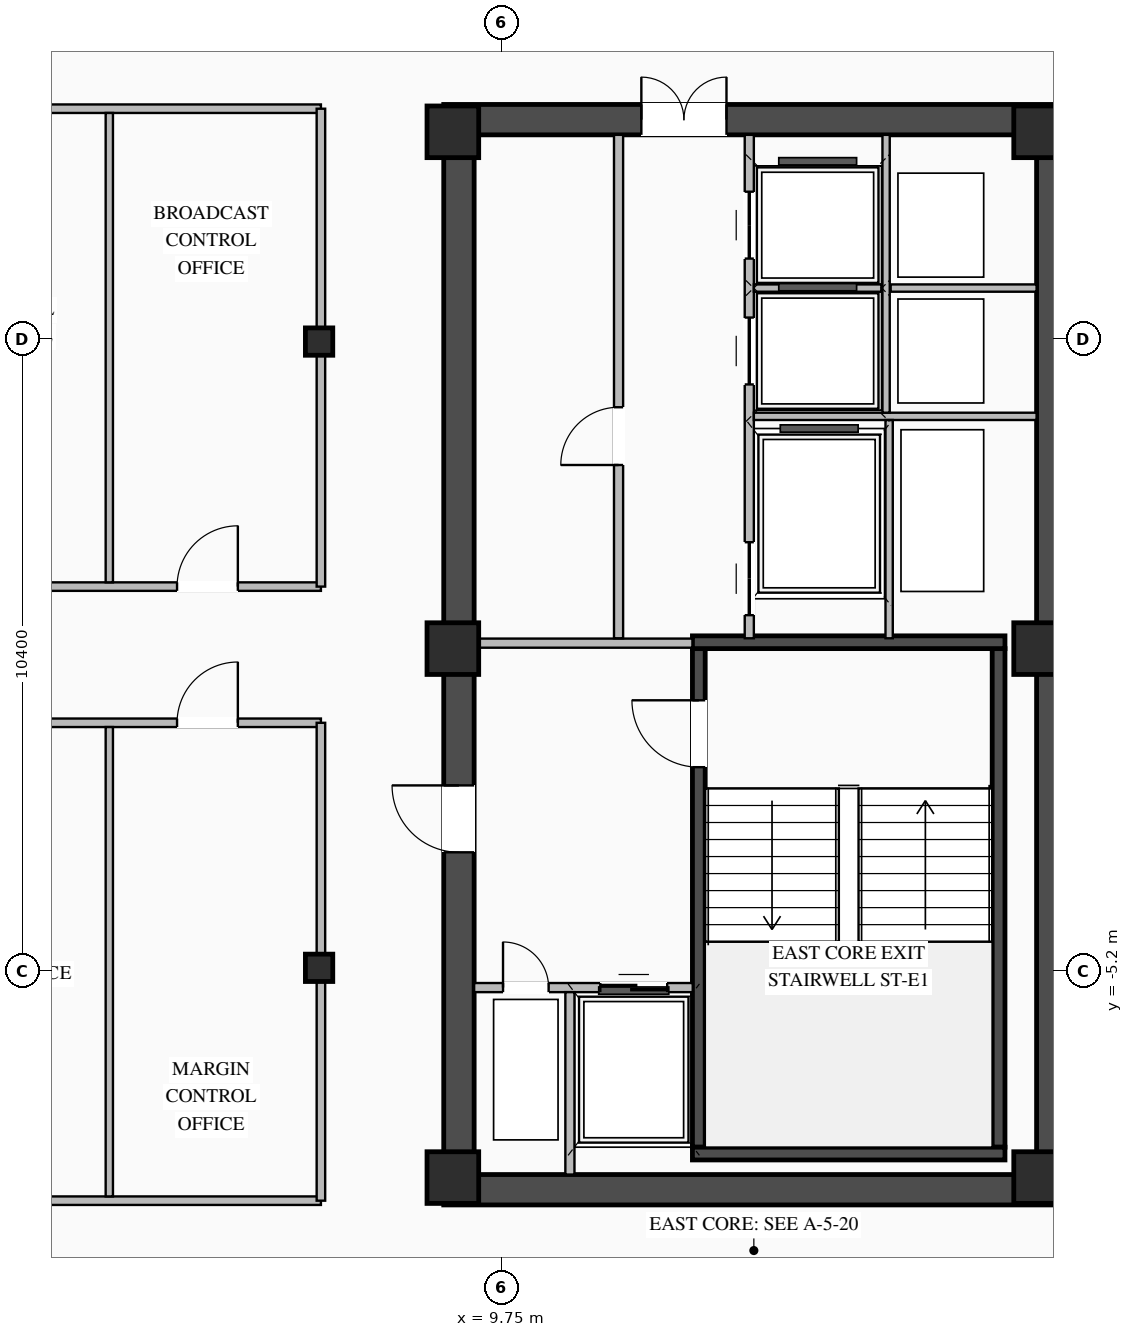
"""IFC4 building model, lengths in metres.
Left out: names, types, materials, properties, quantities, classifications, styles, units other than length and angle.
Written with IfcOpenShell. Run it as: python <this file> out.ifc"""

import sys

from ifc_helpers import new_model, si_unit, direction, frame, frame_2d, origin, origin_2d, place, context, subcontext, project, spatial, rectangle, i_section, extrude, element, fill, save


model = new_model("IFC4")
c1 = context("Model", 3, precision=1e-05, world=origin(), true_north=direction((0.0, 1.0)))
c2 = subcontext(c1, "Body", "Model", "MODEL_VIEW")
j1 = project(units=[si_unit("LENGTHUNIT", "METRE"), si_unit("PLANEANGLEUNIT", "RADIAN")], contexts=[c1])
p1 = place(None, origin())
s1 = spatial("IfcSite", under=j1, at=p1, CompositionType="ELEMENT")
p2 = place(p1, origin())
s2 = spatial("IfcBuilding", under=s1, at=p2, CompositionType="ELEMENT")
p3 = place(p2, frame((0.0, 0.0, 279.3)))
s3 = spatial("IfcBuildingStorey", under=s2, at=p3, CompositionType="ELEMENT", Elevation=279.3)
p4 = place(p3, frame((8.8, -8.8, 0.0), z_axis=(0.0, 0.0, 1.0), x_axis=(1.0, 0.0, 0.0)))
e1 = element("IfcWall", 1, at=p4, inside=s3, PredefinedType="SHEAR", context=c2, shape_type="SweptSolid", body=[
    extrude(rectangle(XDim=10.25, YDim=0.5, at=frame_2d((5.125, 0.0))), origin(), (0.0, 0.0, 1.0), 3.27),
])
p5 = place(p3, frame((8.8, 8.8, 0.0), z_axis=(0.0, 0.0, 1.0), x_axis=(1.0, 0.0, 0.0)))
e2 = element("IfcWall", 2, at=p5, inside=s3, PredefinedType="SHEAR", context=c2, shape_type="SweptSolid", body=[
    extrude(rectangle(XDim=10.25, YDim=0.5, at=frame_2d((5.125, 0.0))), origin(), (0.0, 0.0, 1.0), 3.27),
])
p6 = place(p5, frame((3.25, 0.0, 0.0)))
e3 = element("IfcOpeningElement", 3, at=p6, cuts=e2, PredefinedType="OPENING", context=c2, shape_type="SweptSolid", body=[
    extrude(rectangle(XDim=1.4, YDim=2.05, at=frame_2d((0.7, 1.025))), frame((0.0, 0.26, 0.0), z_axis=(0.0, -1.0, 0.0), x_axis=(1.0, 0.0, 0.0)), (0.0, 0.0, 1.0), 0.52),
])
p7 = place(p3, frame((9.05, -8.55, 0.0), z_axis=(0.0, 0.0, 1.0), x_axis=(0.0, 1.0, 0.0)))
e4 = element("IfcWall", 4, at=p7, inside=s3, PredefinedType="SHEAR", context=c2, shape_type="SweptSolid", body=[
    extrude(rectangle(XDim=17.1, YDim=0.5, at=frame_2d((8.55, 0.0))), origin(), (0.0, 0.0, 1.0), 3.27),
])
p8 = place(p7, frame((5.3, 0.0, 0.0)))
e5 = element("IfcOpeningElement", 5, at=p8, cuts=e4, PredefinedType="OPENING", context=c2, shape_type="SweptSolid", body=[
    extrude(rectangle(XDim=1.1, YDim=2.08, at=frame_2d((0.55, 1.04))), frame((0.0, 0.26, 0.0), z_axis=(0.0, -1.0, 0.0), x_axis=(1.0, 0.0, 0.0)), (0.0, 0.0, 1.0), 0.52),
])
p9 = place(p3, frame((18.8, -8.55, 0.0), z_axis=(0.0, 0.0, 1.0), x_axis=(0.0, 1.0, 0.0)))
e6 = element("IfcWall", 6, at=p9, inside=s3, PredefinedType="SHEAR", context=c2, shape_type="SweptSolid", body=[
    extrude(rectangle(XDim=17.1, YDim=0.5, at=frame_2d((8.55, 0.0))), origin(), (0.0, 0.0, 1.0), 3.27),
])
p10 = place(p3, frame((12.995, -8.1, 0.0), z_axis=(0.0, 0.0, 1.0), x_axis=(0.0, 1.0, 0.0)))
e7 = element("IfcWall", 7, at=p10, inside=s3, PredefinedType="SHEAR", context=c2, shape_type="SweptSolid", body=[
    extrude(rectangle(XDim=8.2, YDim=0.21, at=frame_2d((4.1, 0.0))), origin(), (0.0, 0.0, 1.0), 3.27),
])
p11 = place(p10, frame((6.25, 0.0, 0.0)))
e8 = element("IfcOpeningElement", 8, at=p11, cuts=e7, PredefinedType="OPENING", context=c2, shape_type="SweptSolid", body=[
    extrude(rectangle(XDim=1.1, YDim=2.15, at=frame_2d((0.55, 1.075))), frame((0.0, 0.115, 0.0), z_axis=(0.0, -1.0, 0.0), x_axis=(1.0, 0.0, 0.0)), (0.0, 0.0, 1.0), 0.23),
])
p12 = place(p3, frame((17.925, -8.1, 0.0), z_axis=(0.0, 0.0, 1.0), x_axis=(0.0, 1.0, 0.0)))
e9 = element("IfcWall", 9, at=p12, inside=s3, PredefinedType="SHEAR", context=c2, shape_type="SweptSolid", body=[
    extrude(rectangle(XDim=8.2, YDim=0.21, at=frame_2d((4.1, 0.0))), origin(), (0.0, 0.0, 1.0), 3.27),
])
for number, where, z_axis, x_axis in (
    (10, (12.89, -8.205, 0.0), (0.0, 0.0, 1.0), (1.0, 0.0, 0.0)),
    (11, (18.03, 0.205, 0.0), (0.0, 0.0, 1.0), (-1.0, 0.0, 0.0)),
):
    element("IfcWall", number, at=place(p3, frame(where, z_axis=z_axis, x_axis=x_axis)), inside=s3, PredefinedType="SHEAR", context=c2, shape_type="SweptSolid", body=[
        extrude(rectangle(XDim=5.14, YDim=0.21, at=frame_2d((2.57, 0.0))), origin(), (0.0, 0.0, 1.0), 3.27),
    ])
for number, where, z_axis, x_axis in (
    (12, (8.95, -8.6, 0.0), (0.0, 0.0, 1.0), (1.0, 0.0, 0.0)),
    (13, (8.95, 0.1, 0.0), (0.0, 0.0, 1.0), (1.0, 0.0, 0.0)),
    (14, (8.95, 8.6, 0.0), (0.0, 0.0, 1.0), (1.0, 0.0, 0.0)),
    (15, (18.6, -8.6, 0.0), (0.0, 0.0, 1.0), (1.0, 0.0, 0.0)),
    (16, (18.6, 0.1, 0.0), (0.0, 0.0, 1.0), (1.0, 0.0, 0.0)),
    (17, (18.6, 8.6, 0.0), (0.0, 0.0, 1.0), (1.0, 0.0, 0.0)),
):
    element("IfcColumn", number, at=place(p3, frame(where, z_axis=z_axis, x_axis=x_axis)), inside=s3, PredefinedType="COLUMN", context=c2, shape_type="SweptSolid", body=[
        extrude(rectangle(XDim=0.85, YDim=0.85, at=origin_2d()), origin(), (0.0, 0.0, 1.0), 3.45),
    ])
for number, where, z_axis, x_axis in (
    (18, (6.75, -5.15, 0.0), (0.0, 0.0, 1.0), (1.0, 0.0, 0.0)),
    (19, (6.75, 5.15, 0.0), (0.0, 0.0, 1.0), (1.0, 0.0, 0.0)),
):
    element("IfcColumn", number, at=place(p3, frame(where, z_axis=z_axis, x_axis=x_axis)), inside=s3, PredefinedType="COLUMN", context=c2, shape_type="SweptSolid", body=[
        extrude(i_section(OverallWidth=0.45, OverallDepth=0.45, WebThickness=0.022, FlangeThickness=0.032, at=origin_2d()), origin(), (0.0, 0.0, 1.0), 3.45),
    ])
p13 = place(p3, frame((9.3, -5.475, 0.0), z_axis=(0.0, 0.0, 1.0), x_axis=(1.0, 0.0, 0.0)))
e20 = element("IfcWall", 20, at=p13, inside=s3, PredefinedType="STANDARD", context=c2, shape_type="SweptSolid", body=[
    extrude(rectangle(XDim=3.595, YDim=0.15, at=frame_2d((1.797, 0.0))), origin(), (0.0, 0.0, 1.0), 3.25),
])
p14 = place(p13, frame((2.075, 0.0, 0.0)))
e21 = element("IfcOpeningElement", 21, at=p14, cuts=e20, PredefinedType="OPENING", context=c2, shape_type="SweptSolid", body=[
    extrude(rectangle(XDim=1.1, YDim=2.15, at=frame_2d((0.55, 1.075))), frame((0.0, 0.085, 0.0), z_axis=(0.0, -1.0, 0.0), x_axis=(1.0, 0.0, 0.0)), (0.0, 0.0, 1.0), 0.17),
])
p15 = place(p13, frame((0.475, 0.0, 0.0)))
e22 = element("IfcOpeningElement", 22, at=p15, cuts=e20, PredefinedType="OPENING", context=c2, shape_type="SweptSolid", body=[
    extrude(rectangle(XDim=0.75, YDim=2.05, at=frame_2d((0.375, 1.025))), frame((0.0, 0.085, 0.0), z_axis=(0.0, -1.0, 0.0), x_axis=(1.0, 0.0, 0.0)), (0.0, 0.0, 1.0), 0.17),
])
p16 = place(p3, frame((10.875, -8.55, 0.0), z_axis=(0.0, 0.0, 1.0), x_axis=(0.0, 1.0, 0.0)))
e23 = element("IfcWall", 23, at=p16, inside=s3, PredefinedType="STANDARD", context=c2, shape_type="SweptSolid", body=[
    extrude(rectangle(XDim=3.0, YDim=0.15, at=frame_2d((1.5, 0.0))), origin(), (0.0, 0.0, 1.0), 3.25),
])
p17 = place(p3, frame((9.3, 0.19, 0.0), z_axis=(0.0, 0.0, 1.0), x_axis=(1.0, 0.0, 0.0)))
e24 = element("IfcWall", 24, at=p17, inside=s3, PredefinedType="STANDARD", context=c2, shape_type="SweptSolid", body=[
    extrude(rectangle(XDim=3.59, YDim=0.15, at=frame_2d((1.795, 0.0))), origin(), (0.0, 0.0, 1.0), 2.645),
])
p18 = place(p3, frame((11.675, 0.27, 0.0), z_axis=(0.0, 0.0, 1.0), x_axis=(0.0, 1.0, 0.0)))
e25 = element("IfcWall", 25, at=p18, inside=s3, PredefinedType="STANDARD", context=c2, shape_type="SweptSolid", body=[
    extrude(rectangle(XDim=8.28, YDim=0.15, at=frame_2d((4.14, 0.0))), origin(), (0.0, 0.0, 1.0), 3.25),
])
p19 = place(p18, frame((2.85, 0.0, 0.0)))
e26 = element("IfcOpeningElement", 26, at=p19, cuts=e25, PredefinedType="OPENING", context=c2, shape_type="SweptSolid", body=[
    extrude(rectangle(XDim=0.95, YDim=2.05, at=frame_2d((0.475, 1.025))), frame((0.0, 0.085, 0.0), z_axis=(0.0, -1.0, 0.0), x_axis=(1.0, 0.0, 0.0)), (0.0, 0.0, 1.0), 0.17),
])
p20 = place(p3, frame((13.825, 0.27, 0.0), z_axis=(0.0, 0.0, 1.0), x_axis=(0.0, 1.0, 0.0)))
e27 = element("IfcWall", 27, at=p20, inside=s3, PredefinedType="STANDARD", context=c2, shape_type="SweptSolid", body=[
    extrude(rectangle(XDim=8.28, YDim=0.15, at=frame_2d((4.14, 0.0))), origin(), (0.0, 0.0, 1.0), 3.25),
])
p21 = place(p20, frame((4.175, 0.0, 0.0)))
e28 = element("IfcOpeningElement", 28, at=p21, cuts=e27, PredefinedType="OPENING", context=c2, shape_type="SweptSolid", body=[
    extrude(rectangle(XDim=1.1, YDim=2.1, at=frame_2d((0.55, 1.05))), frame((0.0, 0.085, 0.0), z_axis=(0.0, -1.0, 0.0), x_axis=(1.0, 0.0, 0.0)), (0.0, 0.0, 1.0), 0.17),
])
p22 = place(p20, frame((6.245, 0.0, 0.0)))
e29 = element("IfcOpeningElement", 29, at=p22, cuts=e27, PredefinedType="OPENING", context=c2, shape_type="SweptSolid", body=[
    extrude(rectangle(XDim=1.1, YDim=2.1, at=frame_2d((0.55, 1.05))), frame((0.0, 0.085, 0.0), z_axis=(0.0, -1.0, 0.0), x_axis=(1.0, 0.0, 0.0)), (0.0, 0.0, 1.0), 0.17),
])
p23 = place(p20, frame((0.38, 0.0, 0.0)))
e30 = element("IfcOpeningElement", 30, at=p23, cuts=e27, PredefinedType="OPENING", context=c2, shape_type="SweptSolid", body=[
    extrude(rectangle(XDim=1.2, YDim=2.1, at=frame_2d((0.6, 1.05))), frame((0.0, 0.085, 0.0), z_axis=(0.0, -1.0, 0.0), x_axis=(1.0, 0.0, 0.0)), (0.0, 0.0, 1.0), 0.17),
])
p24 = place(p3, frame((13.9, 3.92, 0.0), z_axis=(0.0, 0.0, 1.0), x_axis=(1.0, 0.0, 0.0)))
e31 = element("IfcWall", 31, at=p24, inside=s3, PredefinedType="STANDARD", context=c2, shape_type="SweptSolid", body=[
    extrude(rectangle(XDim=4.65, YDim=0.12, at=frame_2d((2.325, 0.0))), origin(), (0.0, 0.0, 1.0), 3.25),
])
p25 = place(p3, frame((16.15, 6.03, 0.0), z_axis=(0.0, 0.0, 1.0), x_axis=(1.0, 0.0, 0.0)))
e32 = element("IfcWall", 32, at=p25, inside=s3, PredefinedType="STANDARD", context=c2, shape_type="SweptSolid", body=[
    extrude(rectangle(XDim=2.4, YDim=0.12, at=frame_2d((1.2, 0.0))), origin(), (0.0, 0.0, 1.0), 3.25),
])
p26 = place(p3, frame((16.075, 3.98, 0.0), z_axis=(0.0, 0.0, 1.0), x_axis=(0.0, 1.0, 0.0)))
e33 = element("IfcWall", 33, at=p26, inside=s3, PredefinedType="STANDARD", context=c2, shape_type="SweptSolid", body=[
    extrude(rectangle(XDim=4.57, YDim=0.12, at=frame_2d((2.285, 0.0))), origin(), (0.0, 0.0, 1.0), 3.25),
])
p27 = place(p3, frame((13.9, 6.03, 0.0), z_axis=(0.0, 0.0, 1.0), x_axis=(1.0, 0.0, 0.0)))
e34 = element("IfcWall", 34, at=p27, inside=s3, PredefinedType="STANDARD", context=c2, shape_type="SweptSolid", body=[
    extrude(rectangle(XDim=2.1, YDim=0.12, at=frame_2d((1.05, 0.0))), origin(), (0.0, 0.0, 1.0), 3.25),
])
p28 = place(p3, frame((16.125, 0.27, 0.0), z_axis=(0.0, 0.0, 1.0), x_axis=(0.0, 1.0, 0.0)))
e35 = element("IfcWall", 35, at=p28, inside=s3, PredefinedType="STANDARD", context=c2, shape_type="SweptSolid", body=[
    extrude(rectangle(XDim=3.59, YDim=0.12, at=frame_2d((1.795, 0.0))), origin(), (0.0, 0.0, 1.0), 3.25),
])
p29 = place(p3, frame((-6.78, 1.12, 0.0), z_axis=(0.0, 0.0, 1.0), x_axis=(1.0, 0.0, 0.0)))
e36 = element("IfcWall", 36, at=p29, inside=s3, PredefinedType="STANDARD", context=c2, shape_type="SweptSolid", body=[
    extrude(rectangle(XDim=13.56, YDim=0.14, at=frame_2d((6.78, 0.0))), origin(), (0.0, 0.0, 1.0), 3.25),
])
p30 = place(p29, frame((1.366, 0.0, 0.0)))
e37 = element("IfcOpeningElement", 37, at=p30, cuts=e36, PredefinedType="OPENING", context=c2, shape_type="SweptSolid", body=[
    extrude(rectangle(XDim=1.0, YDim=2.08, at=frame_2d((0.5, 1.04))), frame((0.0, 0.08, 0.0), z_axis=(0.0, -1.0, 0.0), x_axis=(1.0, 0.0, 0.0)), (0.0, 0.0, 1.0), 0.16),
])
p31 = place(p29, frame((4.63, 0.0, 0.0)))
e38 = element("IfcOpeningElement", 38, at=p31, cuts=e36, PredefinedType="OPENING", context=c2, shape_type="SweptSolid", body=[
    extrude(rectangle(XDim=1.0, YDim=2.08, at=frame_2d((0.5, 1.04))), frame((0.0, 0.08, 0.0), z_axis=(0.0, -1.0, 0.0), x_axis=(1.0, 0.0, 0.0)), (0.0, 0.0, 1.0), 0.16),
])
p32 = place(p29, frame((7.93, 0.0, 0.0)))
e39 = element("IfcOpeningElement", 39, at=p32, cuts=e36, PredefinedType="OPENING", context=c2, shape_type="SweptSolid", body=[
    extrude(rectangle(XDim=1.0, YDim=2.08, at=frame_2d((0.5, 1.04))), frame((0.0, 0.08, 0.0), z_axis=(0.0, -1.0, 0.0), x_axis=(1.0, 0.0, 0.0)), (0.0, 0.0, 1.0), 0.16),
])
p33 = place(p29, frame((11.194, 0.0, 0.0)))
e40 = element("IfcOpeningElement", 40, at=p33, cuts=e36, PredefinedType="OPENING", context=c2, shape_type="SweptSolid", body=[
    extrude(rectangle(XDim=1.0, YDim=2.08, at=frame_2d((0.5, 1.04))), frame((0.0, 0.08, 0.0), z_axis=(0.0, -1.0, 0.0), x_axis=(1.0, 0.0, 0.0)), (0.0, 0.0, 1.0), 0.16),
])
p34 = place(p3, frame((-6.78, 8.98, 0.0), z_axis=(0.0, 0.0, 1.0), x_axis=(1.0, 0.0, 0.0)))
e41 = element("IfcWall", 41, at=p34, inside=s3, PredefinedType="STANDARD", context=c2, shape_type="SweptSolid", body=[
    extrude(rectangle(XDim=13.56, YDim=0.14, at=frame_2d((6.78, 0.0))), origin(), (0.0, 0.0, 1.0), 3.25),
])
p35 = place(p3, frame((6.78, 1.12, 0.0), z_axis=(0.0, 0.0, 1.0), x_axis=(0.0, 1.0, 0.0)))
e42 = element("IfcWall", 42, at=p35, inside=s3, PredefinedType="STANDARD", context=c2, shape_type="SweptSolid", body=[
    extrude(rectangle(XDim=7.86, YDim=0.14, at=frame_2d((3.93, 0.0))), origin(), (0.0, 0.0, 1.0), 2.645),
])
p36 = place(p3, frame((3.3, 1.19, 0.0), z_axis=(0.0, 0.0, 1.0), x_axis=(0.0, 1.0, 0.0)))
e43 = element("IfcWall", 43, at=p36, inside=s3, PredefinedType="STANDARD", context=c2, shape_type="SweptSolid", body=[
    extrude(rectangle(XDim=7.72, YDim=0.12, at=frame_2d((3.86, 0.0))), origin(), (0.0, 0.0, 1.0), 3.25),
])
p37 = place(p3, frame((-6.78, -1.12, 0.0), z_axis=(0.0, 0.0, 1.0), x_axis=(1.0, 0.0, 0.0)))
e44 = element("IfcWall", 44, at=p37, inside=s3, PredefinedType="STANDARD", context=c2, shape_type="SweptSolid", body=[
    extrude(rectangle(XDim=13.56, YDim=0.14, at=frame_2d((6.78, 0.0))), origin(), (0.0, 0.0, 1.0), 3.25),
])
p38 = place(p37, frame((1.366, 0.0, 0.0)))
e45 = element("IfcOpeningElement", 45, at=p38, cuts=e44, PredefinedType="OPENING", context=c2, shape_type="SweptSolid", body=[
    extrude(rectangle(XDim=1.0, YDim=2.08, at=frame_2d((0.5, 1.04))), frame((0.0, 0.08, 0.0), z_axis=(0.0, -1.0, 0.0), x_axis=(1.0, 0.0, 0.0)), (0.0, 0.0, 1.0), 0.16),
])
p39 = place(p37, frame((4.63, 0.0, 0.0)))
e46 = element("IfcOpeningElement", 46, at=p39, cuts=e44, PredefinedType="OPENING", context=c2, shape_type="SweptSolid", body=[
    extrude(rectangle(XDim=1.0, YDim=2.08, at=frame_2d((0.5, 1.04))), frame((0.0, 0.08, 0.0), z_axis=(0.0, -1.0, 0.0), x_axis=(1.0, 0.0, 0.0)), (0.0, 0.0, 1.0), 0.16),
])
p40 = place(p37, frame((7.93, 0.0, 0.0)))
e47 = element("IfcOpeningElement", 47, at=p40, cuts=e44, PredefinedType="OPENING", context=c2, shape_type="SweptSolid", body=[
    extrude(rectangle(XDim=1.0, YDim=2.08, at=frame_2d((0.5, 1.04))), frame((0.0, 0.08, 0.0), z_axis=(0.0, -1.0, 0.0), x_axis=(1.0, 0.0, 0.0)), (0.0, 0.0, 1.0), 0.16),
])
p41 = place(p37, frame((11.194, 0.0, 0.0)))
e48 = element("IfcOpeningElement", 48, at=p41, cuts=e44, PredefinedType="OPENING", context=c2, shape_type="SweptSolid", body=[
    extrude(rectangle(XDim=1.0, YDim=2.08, at=frame_2d((0.5, 1.04))), frame((0.0, 0.08, 0.0), z_axis=(0.0, -1.0, 0.0), x_axis=(1.0, 0.0, 0.0)), (0.0, 0.0, 1.0), 0.16),
])
p42 = place(p3, frame((-6.78, -8.98, 0.0), z_axis=(0.0, 0.0, 1.0), x_axis=(1.0, 0.0, 0.0)))
e49 = element("IfcWall", 49, at=p42, inside=s3, PredefinedType="STANDARD", context=c2, shape_type="SweptSolid", body=[
    extrude(rectangle(XDim=13.56, YDim=0.14, at=frame_2d((6.78, 0.0))), origin(), (0.0, 0.0, 1.0), 3.25),
])
p43 = place(p3, frame((6.78, -8.98, 0.0), z_axis=(0.0, 0.0, 1.0), x_axis=(0.0, 1.0, 0.0)))
e50 = element("IfcWall", 50, at=p43, inside=s3, PredefinedType="STANDARD", context=c2, shape_type="SweptSolid", body=[
    extrude(rectangle(XDim=7.86, YDim=0.14, at=frame_2d((3.93, 0.0))), origin(), (0.0, 0.0, 1.0), 2.645),
])
p44 = place(p3, frame((3.3, -8.91, 0.0), z_axis=(0.0, 0.0, 1.0), x_axis=(0.0, 1.0, 0.0)))
e51 = element("IfcWall", 51, at=p44, inside=s3, PredefinedType="STANDARD", context=c2, shape_type="SweptSolid", body=[
    extrude(rectangle(XDim=7.72, YDim=0.12, at=frame_2d((3.86, 0.0))), origin(), (0.0, 0.0, 1.0), 3.25),
])
p45 = place(p11, origin())
e52 = element("IfcDoor", 52, at=p45, inside=s3, OperationType="SINGLE_SWING_RIGHT", PredefinedType="DOOR", context=c2, shape_type="SweptSolid", body=[
    extrude(rectangle(XDim=1.1, YDim=2.15, at=frame_2d((0.55, 1.075))), frame((0.0, 0.025, 0.0), z_axis=(0.0, -1.0, 0.0), x_axis=(1.0, 0.0, 0.0)), (0.0, 0.0, 1.0), 0.05),
])
fill(e8, e52)
p46 = place(p14, origin())
e53 = element("IfcDoor", 53, at=p46, inside=s3, OperationType="DOUBLE_DOOR_SLIDING", PredefinedType="DOOR", context=c2, shape_type="SweptSolid", body=[
    extrude(rectangle(XDim=1.1, YDim=2.15, at=frame_2d((0.55, 1.075))), frame((0.0, 0.025, 0.0), z_axis=(0.0, -1.0, 0.0), x_axis=(1.0, 0.0, 0.0)), (0.0, 0.0, 1.0), 0.05),
])
fill(e21, e53)
p47 = place(p15, origin())
e54 = element("IfcDoor", 54, at=p47, inside=s3, OperationType="SINGLE_SWING_LEFT", PredefinedType="DOOR", context=c2, shape_type="SweptSolid", body=[
    extrude(rectangle(XDim=0.75, YDim=2.05, at=frame_2d((0.375, 1.025))), frame((0.0, 0.025, 0.0), z_axis=(0.0, -1.0, 0.0), x_axis=(1.0, 0.0, 0.0)), (0.0, 0.0, 1.0), 0.05),
])
fill(e22, e54)
p48 = place(p8, origin())
e55 = element("IfcDoor", 55, at=p48, inside=s3, OperationType="SINGLE_SWING_RIGHT", PredefinedType="DOOR", context=c2, shape_type="SweptSolid", body=[
    extrude(rectangle(XDim=1.1, YDim=2.08, at=frame_2d((0.55, 1.04))), frame((0.0, -0.155, 0.0), z_axis=(0.0, -1.0, 0.0), x_axis=(1.0, 0.0, 0.0)), (0.0, 0.0, 1.0), 0.05),
])
fill(e5, e55)
p49 = place(p6, origin())
e56 = element("IfcDoor", 56, at=p49, inside=s3, OperationType="DOUBLE_DOOR_SINGLE_SWING", PredefinedType="DOOR", context=c2, shape_type="SweptSolid", body=[
    extrude(rectangle(XDim=1.4, YDim=2.05, at=frame_2d((0.7, 1.025))), frame((0.0, 0.195, 0.0), z_axis=(0.0, -1.0, 0.0), x_axis=(1.0, 0.0, 0.0)), (0.0, 0.0, 1.0), 0.05),
])
fill(e3, e56)
p50 = place(p19, origin())
e57 = element("IfcDoor", 57, at=p50, inside=s3, OperationType="SINGLE_SWING_LEFT", PredefinedType="DOOR", context=c2, shape_type="SweptSolid", body=[
    extrude(rectangle(XDim=0.95, YDim=2.05, at=frame_2d((0.475, 1.025))), frame((0.0, 0.025, 0.0), z_axis=(0.0, -1.0, 0.0), x_axis=(1.0, 0.0, 0.0)), (0.0, 0.0, 1.0), 0.05),
])
fill(e26, e57)
p51 = place(p21, origin())
e58 = element("IfcDoor", 58, at=p51, inside=s3, OperationType="DOUBLE_DOOR_SLIDING", PredefinedType="DOOR", context=c2, shape_type="SweptSolid", body=[
    extrude(rectangle(XDim=1.1, YDim=2.1, at=frame_2d((0.55, 1.05))), frame((0.0, 0.025, 0.0), z_axis=(0.0, -1.0, 0.0), x_axis=(1.0, 0.0, 0.0)), (0.0, 0.0, 1.0), 0.05),
])
fill(e28, e58)
p52 = place(p22, origin())
e59 = element("IfcDoor", 59, at=p52, inside=s3, OperationType="DOUBLE_DOOR_SLIDING", PredefinedType="DOOR", context=c2, shape_type="SweptSolid", body=[
    extrude(rectangle(XDim=1.1, YDim=2.1, at=frame_2d((0.55, 1.05))), frame((0.0, 0.025, 0.0), z_axis=(0.0, -1.0, 0.0), x_axis=(1.0, 0.0, 0.0)), (0.0, 0.0, 1.0), 0.05),
])
fill(e29, e59)
p53 = place(p23, origin())
e60 = element("IfcDoor", 60, at=p53, inside=s3, OperationType="DOUBLE_DOOR_SLIDING", PredefinedType="DOOR", context=c2, shape_type="SweptSolid", body=[
    extrude(rectangle(XDim=1.2, YDim=2.1, at=frame_2d((0.6, 1.05))), frame((0.0, 0.025, 0.0), z_axis=(0.0, -1.0, 0.0), x_axis=(1.0, 0.0, 0.0)), (0.0, 0.0, 1.0), 0.05),
])
fill(e30, e60)
p54 = place(p33, origin())
e61 = element("IfcDoor", 61, at=p54, inside=s3, OperationType="SINGLE_SWING_RIGHT", PredefinedType="DOOR", context=c2, shape_type="SweptSolid", body=[
    extrude(rectangle(XDim=1.0, YDim=2.08, at=frame_2d((0.5, 1.04))), frame((0.0, 0.025, 0.0), z_axis=(0.0, -1.0, 0.0), x_axis=(1.0, 0.0, 0.0)), (0.0, 0.0, 1.0), 0.05),
])
fill(e40, e61)
p55 = place(p41, origin())
e62 = element("IfcDoor", 62, at=p55, inside=s3, OperationType="SINGLE_SWING_RIGHT", PredefinedType="DOOR", context=c2, shape_type="SweptSolid", body=[
    extrude(rectangle(XDim=1.0, YDim=2.08, at=frame_2d((0.5, 1.04))), frame((0.0, 0.025, 0.0), z_axis=(0.0, -1.0, 0.0), x_axis=(1.0, 0.0, 0.0)), (0.0, 0.0, 1.0), 0.05),
])
fill(e48, e62)
save(model, sys.argv[1])
